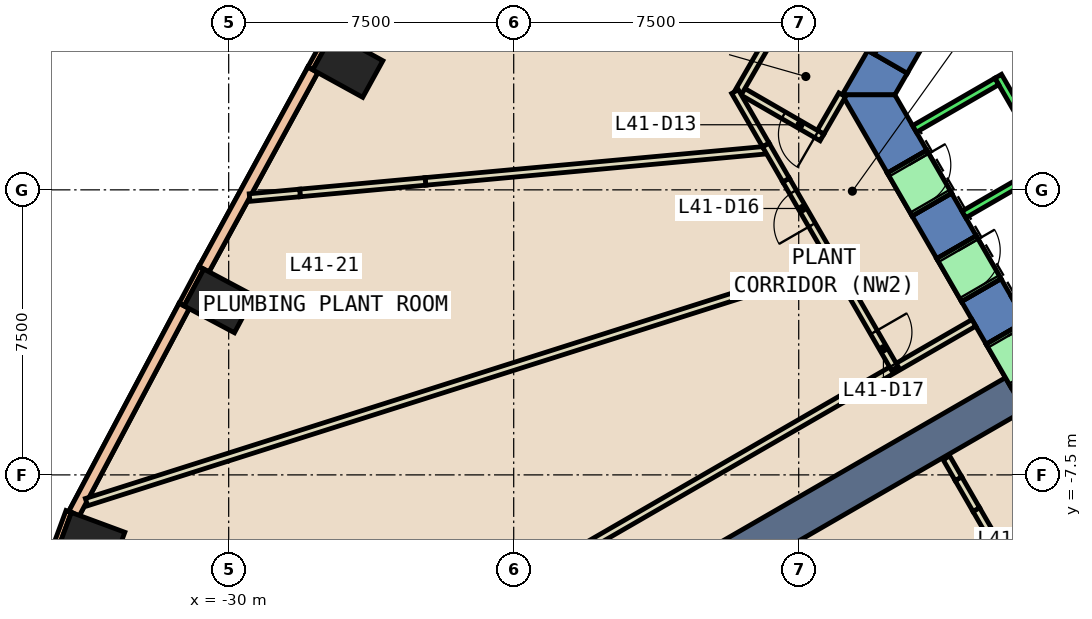
"""IFC4 building model, lengths in metres.
Left out: names, types, materials, properties, quantities, classifications, styles, units other than length and angle.
Written with IfcOpenShell. Run it as: python <this file> out.ifc"""

import sys

from ifc_helpers import new_model, si_unit, direction, frame, frame_2d, origin, origin_2d, place, context, subcontext, project, spatial, polyline, rectangle, outline, extrude, element, fill, save


model = new_model("IFC4")
c1 = context("Model", 3, precision=1e-05, world=origin(), true_north=direction((0.0, 1.0)))
c2 = subcontext(c1, "Body", "Model", "MODEL_VIEW")
j1 = project(units=[si_unit("LENGTHUNIT", "METRE"), si_unit("PLANEANGLEUNIT", "RADIAN")], contexts=[c1])
p1 = place(None, origin())
s1 = spatial("IfcSite", under=j1, at=p1, CompositionType="ELEMENT")
p2 = place(p1, origin())
s2 = spatial("IfcBuilding", under=s1, at=p2, CompositionType="ELEMENT")
p3 = place(p2, frame((0.0, 0.0, 184.4)))
s3 = spatial("IfcBuildingStorey", under=s2, at=p3, CompositionType="ELEMENT", Elevation=184.4)
for number, where, z_axis, x_axis in (
    (1, (-26.865, 3.278, -0.6), (0.0, 0.0, 1.0), (0.482, 0.876, 0.0)),
    (2, (-30.252, -2.922, -0.6), (0.0, 0.0, 1.0), (0.47, 0.883, 0.0)),
    (3, (-33.627, -9.265, -0.6), (0.0, 0.0, 1.0), (0.347, 0.938, 0.0)),
):
    element("IfcColumn", number, at=place(p3, frame(where, z_axis=z_axis, x_axis=x_axis)), inside=s3, PredefinedType="COLUMN", context=c2, shape_type="SweptSolid", body=[
        extrude(rectangle(XDim=1.1, YDim=1.5, at=origin_2d()), origin(), (0.0, 0.0, 1.0), 5.4),
    ])
p4 = place(p3, frame((0.0, 0.0, -0.6)))
e4 = element("IfcWall", 4, at=p4, inside=s3, PredefinedType="SHEAR", context=c2, shape_type="SweptSolid", body=[
    extrude(outline(polyline([(-12.143, 3.068), (-13.182, 3.667), (-13.856, 2.5), (-12.471, 2.5), (-12.143, 3.068)])), origin(), (0.0, 0.0, 1.0), 5.4),
])
p5 = place(p3, frame((0.0, 0.0, 3.6)))
e5 = element("IfcWall", 5, at=p5, inside=s3, PredefinedType="SHEAR", context=c2, shape_type="SweptSolid", body=[
    extrude(outline(polyline([(-13.182, 3.667), (-12.143, 3.068), (-11.228, 4.652), (-12.267, 5.252), (-13.182, 3.667)])), origin(), (0.0, 0.0, 1.0), 1.2),
])
p6 = place(p3, frame((0.0, 0.0, -0.6)))
e6 = element("IfcWall", 6, at=p6, inside=s3, PredefinedType="SHEAR", context=c2, shape_type="SweptSolid", body=[
    extrude(outline(polyline([(-12.667, 0.44), (-11.628, 1.04), (-12.471, 2.5), (-13.856, 2.5), (-12.667, 0.44)])), origin(), (0.0, 0.0, 1.0), 5.4),
])
p7 = place(p3, frame((0.0, 0.0, -0.6)))
e7 = element("IfcWall", 7, at=p7, inside=s3, PredefinedType="SHEAR", context=c2, shape_type="SweptSolid", body=[
    extrude(outline(polyline([(-11.367, -1.811), (-10.328, -1.211), (-10.978, -0.086), (-12.017, -0.686), (-11.367, -1.811)])), origin(), (0.0, 0.0, 1.0), 5.4),
])
p8 = place(p3, frame((0.0, 0.0, -0.6)))
e8 = element("IfcWall", 8, at=p8, inside=s3, PredefinedType="SHEAR", context=c2, shape_type="SweptSolid", body=[
    extrude(outline(polyline([(-10.067, -4.063), (-9.028, -3.463), (-9.678, -2.337), (-10.717, -2.937), (-10.067, -4.063)])), origin(), (0.0, 0.0, 1.0), 5.4),
])
p9 = place(p3, frame((0.0, 0.0, -0.6)))
e9 = element("IfcWall", 9, at=p9, inside=s3, PredefinedType="SHEAR", context=c2, shape_type="SweptSolid", body=[
    extrude(outline(polyline([(-8.767, -6.314), (-7.728, -5.714), (-8.378, -4.589), (-9.417, -5.189), (-8.767, -6.314)])), origin(), (0.0, 0.0, 1.0), 5.4),
])
p10 = place(p3, frame((0.0, 0.0, 3.6)))
e10 = element("IfcWall", 10, at=p10, inside=s3, PredefinedType="SHEAR", context=c2, shape_type="SweptSolid", body=[
    extrude(outline(polyline([(-12.017, -0.686), (-10.978, -0.086), (-11.628, 1.04), (-12.667, 0.44), (-12.017, -0.686)])), origin(), (0.0, 0.0, 1.0), 1.2),
])
p11 = place(p3, frame((0.0, 0.0, 3.6)))
e11 = element("IfcWall", 11, at=p11, inside=s3, PredefinedType="SHEAR", context=c2, shape_type="SweptSolid", body=[
    extrude(outline(polyline([(-10.717, -2.937), (-9.678, -2.337), (-10.328, -1.211), (-11.367, -1.811), (-10.717, -2.937)])), origin(), (0.0, 0.0, 1.0), 1.2),
])
p12 = place(p3, frame((0.0, 0.0, 3.6)))
e12 = element("IfcWall", 12, at=p12, inside=s3, PredefinedType="SHEAR", context=c2, shape_type="SweptSolid", body=[
    extrude(outline(polyline([(-9.417, -5.189), (-8.378, -4.589), (-9.028, -3.463), (-10.067, -4.063), (-9.417, -5.189)])), origin(), (0.0, 0.0, 1.0), 1.2),
])
p13 = place(p3, frame((-9.31, -5.375, 0.0), z_axis=(0.0, 0.0, 1.0), x_axis=(-0.866015103238, -0.500017840646, 0.0)))
e13 = element("IfcWall", 13, at=p13, inside=s3, PredefinedType="SHEAR", context=c2, shape_type="SweptSolid", body=[
    extrude(rectangle(XDim=27.139, YDim=1.0, at=frame_2d((13.57, 0.0))), origin(), (0.0, 0.0, 1.0), 4.8),
])
for number, where, z_axis, x_axis in (
    (14, (-27.323, 4.158, 0.0), (0.0, 0.0, 1.0), (-0.482, -0.876, 0.0)),
    (15, (-30.721, -2.049, 0.0), (0.0, 0.0, 1.0), (-0.47, -0.883, 0.0)),
):
    element("IfcWall", number, at=place(p3, frame(where, z_axis=z_axis, x_axis=x_axis)), inside=s3, PredefinedType="STANDARD", context=c2, shape_type="SweptSolid", body=[
        extrude(rectangle(XDim=1.1, YDim=0.15, at=frame_2d((0.55, 0.0))), origin(), (0.0, 0.0, 1.0), 4.8),
    ])
p14 = place(p3, frame((-34.21, -8.463, 0.0), z_axis=(0.0, 0.0, 1.0), x_axis=(-0.346353054777, -0.93810423805, 0.0)))
e16 = element("IfcWall", 16, at=p14, inside=s3, PredefinedType="STANDARD", context=c2, shape_type="SweptSolid", body=[
    extrude(rectangle(XDim=1.1, YDim=0.15, at=frame_2d((0.55, 0.0))), origin(), (0.0, 0.0, 1.0), 4.8),
])
p15 = place(p3, frame((-27.786, 3.158, 0.0), z_axis=(0.0, 0.0, 1.0), x_axis=(-0.479192671498, -0.87770973766, 0.0)))
e17 = element("IfcWall", 17, at=p15, inside=s3, PredefinedType="STANDARD", context=c2, shape_type="SweptSolid", body=[
    extrude(rectangle(XDim=5.977, YDim=0.3, at=frame_2d((2.988, 0.0))), origin(), (0.0, 0.0, 1.0), 1.2),
])
p16 = place(p3, frame((-27.786, 3.158, 4.0), z_axis=(0.0, 0.0, 1.0), x_axis=(-0.479192671498, -0.87770973766, 0.0)))
e18 = element("IfcWall", 18, at=p16, inside=s3, PredefinedType="STANDARD", context=c2, shape_type="SweptSolid", body=[
    extrude(rectangle(XDim=5.977, YDim=0.3, at=frame_2d((2.988, 0.0))), origin(), (0.0, 0.0, 1.0), 0.8),
])
p17 = place(p3, frame((-31.171, -3.054, 0.0), z_axis=(0.0, 0.0, 1.0), x_axis=(-0.468703860557, -0.883355359467, 0.0)))
e19 = element("IfcWall", 19, at=p17, inside=s3, PredefinedType="STANDARD", context=c2, shape_type="SweptSolid", body=[
    extrude(rectangle(XDim=6.183, YDim=0.3, at=frame_2d((3.092, 0.0))), origin(), (0.0, 0.0, 1.0), 1.2),
])
p18 = place(p3, frame((-31.171, -3.054, 4.0), z_axis=(0.0, 0.0, 1.0), x_axis=(-0.468703860557, -0.883355359467, 0.0)))
e20 = element("IfcWall", 20, at=p18, inside=s3, PredefinedType="STANDARD", context=c2, shape_type="SweptSolid", body=[
    extrude(rectangle(XDim=6.183, YDim=0.3, at=frame_2d((3.092, 0.0))), origin(), (0.0, 0.0, 1.0), 0.8),
])
p19 = place(p3, frame((-35.502, -17.996, 0.0), z_axis=(0.0, 0.0, 1.0), x_axis=(0.866041720547, 0.499971737474, 0.0)))
e21 = element("IfcWall", 21, at=p19, inside=s3, PredefinedType="PARTITIONING", context=c2, shape_type="SweptSolid", body=[
    extrude(rectangle(XDim=28.994, YDim=0.2, at=frame_2d((14.497, 0.0))), origin(), (0.0, 0.0, 1.0), 4.8),
])
p20 = place(p3, frame((-13.856, 2.501, 0.0), z_axis=(0.0, 0.0, 1.0), x_axis=(-0.500316932756, -0.865842345233, 0.0)))
e22 = element("IfcWall", 22, at=p20, inside=s3, PredefinedType="PARTITIONING", context=c2, shape_type="SweptSolid", body=[
    extrude(rectangle(XDim=1.137, YDim=0.2, at=frame_2d((0.569, 0.0))), origin(), (0.0, 0.0, 1.0), 4.8),
])
p21 = place(p3, frame((-14.388, 1.379, 0.0), z_axis=(0.0, 0.0, 1.0), x_axis=(-0.866022959057, 0.500004234368, 0.0)))
e23 = element("IfcWall", 23, at=p21, inside=s3, PredefinedType="PARTITIONING", context=c2, shape_type="SweptSolid", body=[
    extrude(rectangle(XDim=2.5, YDim=0.2, at=frame_2d((1.25, 0.0))), origin(), (0.0, 0.0, 1.0), 4.8),
])
p22 = place(p21, frame((0.168, 0.0, 0.0)))
e24 = element("IfcOpeningElement", 24, at=p22, cuts=e23, PredefinedType="OPENING", context=c2, shape_type="SweptSolid", body=[
    extrude(rectangle(XDim=1.0, YDim=2.1, at=frame_2d((0.5, 1.05))), frame((0.0, 0.11, 0.0), z_axis=(0.0, -1.0, 0.0), x_axis=(1.0, 0.0, 0.0)), (0.0, 0.0, 1.0), 0.22),
])
p23 = place(p3, frame((-16.603, 2.542, 0.0), z_axis=(0.0, 0.0, 1.0), x_axis=(0.499968011863, 0.866043871356, 0.0)))
e25 = element("IfcWall", 25, at=p23, inside=s3, PredefinedType="PARTITIONING", context=c2, shape_type="SweptSolid", body=[
    extrude(rectangle(XDim=7.201, YDim=0.2, at=frame_2d((3.6, 0.0))), origin(), (0.0, 0.0, 1.0), 4.8),
])
p24 = place(p23, frame((2.654, 0.0, 0.0)))
e26 = element("IfcOpeningElement", 26, at=p24, cuts=e25, PredefinedType="OPENING", context=c2, shape_type="SweptSolid", body=[
    extrude(rectangle(XDim=1.0, YDim=2.1, at=frame_2d((0.5, 1.05))), frame((0.0, 0.11, 0.0), z_axis=(0.0, -1.0, 0.0), x_axis=(1.0, 0.0, 0.0)), (0.0, 0.0, 1.0), 0.22),
])
p25 = place(p3, frame((-14.001, -2.05, 0.0), z_axis=(0.0, 0.0, 1.0), x_axis=(-0.499844057801, 0.866115418337, 0.0)))
e27 = element("IfcWall", 27, at=p25, inside=s3, PredefinedType="PARTITIONING", context=c2, shape_type="SweptSolid", body=[
    extrude(rectangle(XDim=2.665, YDim=0.2, at=frame_2d((1.333, 0.0))), origin(), (0.0, 0.0, 1.0), 2.4),
])
p26 = place(p25, frame((1.301, 0.0, 0.0)))
e28 = element("IfcOpeningElement", 28, at=p26, cuts=e27, PredefinedType="OPENING", context=c2, shape_type="SweptSolid", body=[
    extrude(rectangle(XDim=1.0, YDim=2.1, at=frame_2d((0.5, 1.05))), frame((0.0, 0.11, 0.0), z_axis=(0.0, -1.0, 0.0), x_axis=(1.0, 0.0, 0.0)), (0.0, 0.0, 1.0), 0.22),
])
p27 = place(p3, frame((-14.001, -2.05, 0.0), z_axis=(0.0, 0.0, 1.0), x_axis=(0.500026340207, -0.866010195725, 0.0)))
e29 = element("IfcWall", 29, at=p27, inside=s3, PredefinedType="PARTITIONING", context=c2, shape_type="SweptSolid", body=[
    extrude(rectangle(XDim=3.06, YDim=0.2, at=frame_2d((1.53, 0.0))), origin(), (0.0, 0.0, 1.0), 4.8),
])
p28 = place(p27, frame((1.96, 0.0, 0.0)))
e30 = element("IfcOpeningElement", 30, at=p28, cuts=e29, PredefinedType="OPENING", context=c2, shape_type="SweptSolid", body=[
    extrude(rectangle(XDim=1.0, YDim=2.1, at=frame_2d((0.5, 1.05))), frame((0.0, 0.11, 0.0), z_axis=(0.0, -1.0, 0.0), x_axis=(1.0, 0.0, 0.0)), (0.0, 0.0, 1.0), 0.22),
])
p29 = place(p3, frame((-15.791, 1.051, 0.0), z_axis=(0.0, 0.0, 1.0), x_axis=(-0.995813171727, -0.091411853796, 0.0)))
e31 = element("IfcWall", 31, at=p29, inside=s3, PredefinedType="PARTITIONING", context=c2, shape_type="SweptSolid", body=[
    extrude(rectangle(XDim=9.07, YDim=0.2, at=frame_2d((4.535, 0.0))), origin(), (0.0, 0.0, 1.0), 2.4),
])
p30 = place(p3, frame((-14.051, -1.963, 0.0), z_axis=(0.0, 0.0, 1.0), x_axis=(-0.953023422208, -0.302896610617, 0.0)))
e32 = element("IfcWall", 32, at=p30, inside=s3, PredefinedType="PARTITIONING", context=c2, shape_type="SweptSolid", body=[
    extrude(rectangle(XDim=1.641, YDim=0.2, at=frame_2d((0.821, 0.0))), origin(), (0.0, 0.0, 1.0), 2.4),
])
p31 = place(p3, frame((-12.181, 5.202, 0.0), z_axis=(0.0, 0.0, 1.0), x_axis=(-0.500215337403, -0.865901042976, 0.0)))
e33 = element("IfcWall", 33, at=p31, inside=s3, PredefinedType="PARTITIONING", context=c2, shape_type="SweptSolid", body=[
    extrude(rectangle(XDim=1.829, YDim=0.2, at=frame_2d((0.915, 0.0))), origin(), (0.0, 0.0, 1.0), 2.4),
])
p32 = place(p31, frame((0.415, 0.0, 0.0)))
e34 = element("IfcOpeningElement", 34, at=p32, cuts=e33, PredefinedType="OPENING", context=c2, shape_type="SweptSolid", body=[
    extrude(rectangle(XDim=1.0, YDim=2.1, at=frame_2d((0.5, 1.05))), frame((0.0, 0.11, 0.0), z_axis=(0.0, -1.0, 0.0), x_axis=(1.0, 0.0, 0.0)), (0.0, 0.0, 1.0), 0.22),
])
p33 = place(p3, frame((-9.82, -9.291, 0.0), z_axis=(0.0, 0.0, 1.0), x_axis=(-0.500277597875, 0.865865073245, 0.0)))
e35 = element("IfcWall", 35, at=p33, inside=s3, PredefinedType="PARTITIONING", context=c2, shape_type="SweptSolid", body=[
    extrude(rectangle(XDim=1.015, YDim=0.2, at=frame_2d((0.508, 0.0))), origin(), (0.0, 0.0, 1.0), 2.4),
])
p34 = place(p3, frame((-10.328, -8.412, 0.0), z_axis=(0.0, 0.0, 1.0), x_axis=(-0.4998875608, 0.866090310855, 0.0)))
e36 = element("IfcWall", 36, at=p34, inside=s3, PredefinedType="PARTITIONING", context=c2, shape_type="SweptSolid", body=[
    extrude(rectangle(XDim=0.939, YDim=0.2, at=frame_2d((0.469, 0.0))), origin(), (0.0, 0.0, 1.0), 4.8),
])
p35 = place(p3, frame((-10.797, -7.599, 0.0), z_axis=(0.0, 0.0, 1.0), x_axis=(-0.499377186864, 0.866384686638, 0.0)))
e37 = element("IfcWall", 37, at=p35, inside=s3, PredefinedType="PARTITIONING", context=c2, shape_type="SweptSolid", body=[
    extrude(rectangle(XDim=0.633, YDim=0.2, at=frame_2d((0.316, 0.0))), origin(), (0.0, 0.0, 1.0), 2.4),
])
p36 = place(p3, frame((-15.333, 0.258, 0.0), z_axis=(0.0, 0.0, 1.0), x_axis=(-0.499900536046, 0.86608282171, 0.0)))
e38 = element("IfcWall", 38, at=p36, inside=s3, PredefinedType="PARTITIONING", context=c2, shape_type="SweptSolid", body=[
    extrude(rectangle(XDim=1.068, YDim=0.2, at=frame_2d((0.534, 0.0))), origin(), (0.0, 0.0, 1.0), 2.4),
])
p37 = place(p3, frame((-15.867, 1.183, 0.0), z_axis=(0.0, 0.0, 1.0), x_axis=(-0.499800693738, 0.866140442734, 0.0)))
e39 = element("IfcWall", 39, at=p37, inside=s3, PredefinedType="PARTITIONING", context=c2, shape_type="SweptSolid", body=[
    extrude(rectangle(XDim=1.621, YDim=0.2, at=frame_2d((0.811, 0.0))), origin(), (0.0, 0.0, 1.0), 4.8),
])
p38 = place(p3, frame((-24.823, 0.222, 0.0), z_axis=(0.0, 0.0, 1.0), x_axis=(-0.995814353382, -0.091398980293, 0.0)))
e40 = element("IfcWall", 40, at=p38, inside=s3, PredefinedType="PARTITIONING", context=c2, shape_type="SweptSolid", body=[
    extrude(rectangle(XDim=3.315, YDim=0.2, at=frame_2d((1.657, 0.0))), origin(), (0.0, 0.0, 1.0), 4.8),
])
p39 = place(p3, frame((-28.124, -0.081, 0.0), z_axis=(0.0, 0.0, 1.0), x_axis=(-0.995805575694, -0.091494564955, 0.0)))
e41 = element("IfcWall", 41, at=p39, inside=s3, PredefinedType="PARTITIONING", context=c2, shape_type="SweptSolid", body=[
    extrude(rectangle(XDim=1.332, YDim=0.2, at=frame_2d((0.666, 0.0))), origin(), (0.0, 0.0, 1.0), 2.4),
])
p40 = place(p3, frame((-15.615, -2.46, 0.0), z_axis=(0.0, 0.0, 1.0), x_axis=(-0.953081770848, -0.30271296318, 0.0)))
e42 = element("IfcWall", 42, at=p40, inside=s3, PredefinedType="PARTITIONING", context=c2, shape_type="SweptSolid", body=[
    extrude(rectangle(XDim=19.018, YDim=0.2, at=frame_2d((9.509, 0.0))), origin(), (0.0, 0.0, 1.0), 4.8),
])
p41 = place(p3, frame((-9.751, 2.99, 0.0), z_axis=(0.0, 0.0, 1.0), x_axis=(0.50000090737, -0.866024879913, 0.0)))
e43 = element("IfcWall", 43, at=p41, inside=s3, PredefinedType="STANDARD", context=c2, shape_type="SweptSolid", body=[
    extrude(rectangle(XDim=10.6, YDim=0.2, at=frame_2d((5.3, 0.0))), origin(), (0.0, 0.0, 1.0), 4.8),
])
p42 = place(p3, frame((-9.788, 2.853, 0.0), z_axis=(0.0, 0.0, 1.0), x_axis=(-0.865998541277, -0.500046524342, 0.0)))
e44 = element("IfcWall", 44, at=p42, inside=s3, PredefinedType="STANDARD", context=c2, shape_type="SweptSolid", body=[
    extrude(rectangle(XDim=2.5, YDim=0.2, at=frame_2d((1.25, 0.0))), origin(), (0.0, 0.0, 1.0), 4.8),
])
for number, where, z_axis, x_axis in (
    (45, (-8.488, 0.602, 0.0), (0.0, 0.0, 1.0), (-0.866, -0.5, 0.0)),
    (46, (-7.188, -1.65, 0.0), (0.0, 0.0, 1.0), (-0.866, -0.5, 0.0)),
):
    element("IfcWall", number, at=place(p3, frame(where, z_axis=z_axis, x_axis=x_axis)), inside=s3, PredefinedType="STANDARD", context=c2, shape_type="SweptSolid", body=[
        extrude(rectangle(XDim=2.5, YDim=0.2, at=frame_2d((1.25, 0.0))), origin(), (0.0, 0.0, 1.0), 4.8),
    ])
p43 = place(p3, frame((-12.148, 0.74, 0.0), z_axis=(0.0, 0.0, 1.0), x_axis=(0.500221244143, -0.865897630733, 0.0)))
e47 = element("IfcWall", 47, at=p43, inside=s3, PredefinedType="STANDARD", context=c2, shape_type="SweptSolid", body=[
    extrude(rectangle(XDim=1.299, YDim=1.2, at=frame_2d((0.65, 0.0))), origin(), (0.0, 0.0, 1.0), 2.4),
])
p44 = place(p43, frame((0.1, 0.0, 0.0)))
e48 = element("IfcOpeningElement", 48, at=p44, cuts=e47, PredefinedType="OPENING", context=c2, shape_type="SweptSolid", body=[
    extrude(rectangle(XDim=1.1, YDim=2.3, at=frame_2d((0.55, 1.15))), frame((0.0, 0.61, 0.0), z_axis=(0.0, -1.0, 0.0), x_axis=(1.0, 0.0, 0.0)), (0.0, 0.0, 1.0), 1.22),
])
p45 = place(p3, frame((-10.848, -1.511, 0.0), z_axis=(0.0, 0.0, 1.0), x_axis=(0.49989585183, -0.866085525409, 0.0)))
e49 = element("IfcWall", 49, at=p45, inside=s3, PredefinedType="STANDARD", context=c2, shape_type="SweptSolid", body=[
    extrude(rectangle(XDim=1.3, YDim=1.2, at=frame_2d((0.65, 0.0))), origin(), (0.0, 0.0, 1.0), 2.4),
])
p46 = place(p45, frame((0.1, 0.0, 0.0)))
e50 = element("IfcOpeningElement", 50, at=p46, cuts=e49, PredefinedType="OPENING", context=c2, shape_type="SweptSolid", body=[
    extrude(rectangle(XDim=1.1, YDim=2.3, at=frame_2d((0.55, 1.15))), frame((0.0, 0.61, 0.0), z_axis=(0.0, -1.0, 0.0), x_axis=(1.0, 0.0, 0.0)), (0.0, 0.0, 1.0), 1.22),
])
p47 = place(p3, frame((-9.548, -3.763, 0.0), z_axis=(0.0, 0.0, 1.0), x_axis=(0.500036693733, -0.866004217611, 0.0)))
e51 = element("IfcWall", 51, at=p47, inside=s3, PredefinedType="STANDARD", context=c2, shape_type="SweptSolid", body=[
    extrude(rectangle(XDim=1.3, YDim=1.2, at=frame_2d((0.65, 0.0))), origin(), (0.0, 0.0, 1.0), 2.4),
])
p48 = place(p47, frame((0.1, 0.0, 0.0)))
e52 = element("IfcOpeningElement", 52, at=p48, cuts=e51, PredefinedType="OPENING", context=c2, shape_type="SweptSolid", body=[
    extrude(rectangle(XDim=1.1, YDim=2.3, at=frame_2d((0.55, 1.15))), frame((0.0, 0.61, 0.0), z_axis=(0.0, -1.0, 0.0), x_axis=(1.0, 0.0, 0.0)), (0.0, 0.0, 1.0), 1.22),
])
p49 = place(p22, origin())
e53 = element("IfcDoor", 53, at=p49, inside=s3, OperationType="SINGLE_SWING_LEFT", PredefinedType="DOOR", context=c2, shape_type="SweptSolid", body=[
    extrude(rectangle(XDim=1.0, YDim=2.1, at=frame_2d((0.5, 1.05))), frame((0.0, 0.025, 0.0), z_axis=(0.0, -1.0, 0.0), x_axis=(1.0, 0.0, 0.0)), (0.0, 0.0, 1.0), 0.05),
])
fill(e24, e53)
p50 = place(p26, origin())
e54 = element("IfcDoor", 54, at=p50, inside=s3, OperationType="SINGLE_SWING_RIGHT", PredefinedType="DOOR", context=c2, shape_type="SweptSolid", body=[
    extrude(rectangle(XDim=1.0, YDim=2.1, at=frame_2d((0.5, 1.05))), frame((0.0, 0.025, 0.0), z_axis=(0.0, -1.0, 0.0), x_axis=(1.0, 0.0, 0.0)), (0.0, 0.0, 1.0), 0.05),
])
fill(e28, e54)
p51 = place(p28, origin())
e55 = element("IfcDoor", 55, at=p51, inside=s3, OperationType="SINGLE_SWING_LEFT", PredefinedType="DOOR", context=c2, shape_type="SweptSolid", body=[
    extrude(rectangle(XDim=1.0, YDim=2.1, at=frame_2d((0.5, 1.05))), frame((0.0, 0.025, 0.0), z_axis=(0.0, -1.0, 0.0), x_axis=(1.0, 0.0, 0.0)), (0.0, 0.0, 1.0), 0.05),
])
fill(e30, e55)
p52 = place(p44, origin())
e56 = element("IfcDoor", 56, at=p52, inside=s3, OperationType="SLIDING_TO_LEFT", PredefinedType="DOOR", context=c2, shape_type="SweptSolid", body=[
    extrude(rectangle(XDim=1.1, YDim=2.3, at=frame_2d((0.55, 1.15))), frame((0.0, 0.025, 0.0), z_axis=(0.0, -1.0, 0.0), x_axis=(1.0, 0.0, 0.0)), (0.0, 0.0, 1.0), 0.05),
])
fill(e48, e56)
p53 = place(p46, origin())
e57 = element("IfcDoor", 57, at=p53, inside=s3, OperationType="SLIDING_TO_LEFT", PredefinedType="DOOR", context=c2, shape_type="SweptSolid", body=[
    extrude(rectangle(XDim=1.1, YDim=2.3, at=frame_2d((0.55, 1.15))), frame((0.0, 0.025, 0.0), z_axis=(0.0, -1.0, 0.0), x_axis=(1.0, 0.0, 0.0)), (0.0, 0.0, 1.0), 0.05),
])
fill(e50, e57)
p54 = place(p48, origin())
e58 = element("IfcDoor", 58, at=p54, inside=s3, OperationType="SLIDING_TO_LEFT", PredefinedType="DOOR", context=c2, shape_type="SweptSolid", body=[
    extrude(rectangle(XDim=1.1, YDim=2.3, at=frame_2d((0.55, 1.15))), frame((0.0, 0.025, 0.0), z_axis=(0.0, -1.0, 0.0), x_axis=(1.0, 0.0, 0.0)), (0.0, 0.0, 1.0), 0.05),
])
fill(e52, e58)
save(model, sys.argv[1])
